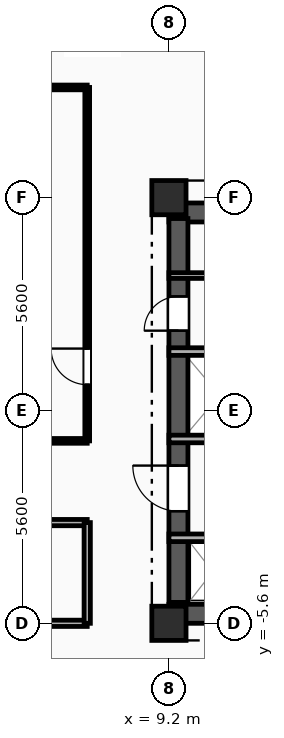
"""IFC4 building model, lengths in metres.
Left out: names, types, materials, properties, quantities, classifications, styles, units other than length and angle.
Written with IfcOpenShell. Run it as: python <this file> out.ifc"""

import sys

from ifc_helpers import new_model, si_unit, direction, frame, frame_2d, origin, origin_2d, place, context, subcontext, project, spatial, rectangle, extrude, element, fill, save


model = new_model("IFC4")
c1 = context("Model", 3, precision=1e-05, world=origin(), true_north=direction((0.0, 1.0)))
c2 = subcontext(c1, "Body", "Model", "MODEL_VIEW")
j1 = project(units=[si_unit("LENGTHUNIT", "METRE"), si_unit("PLANEANGLEUNIT", "RADIAN")], contexts=[c1])
p1 = place(None, origin())
s1 = spatial("IfcSite", under=j1, at=p1, CompositionType="ELEMENT")
p2 = place(p1, origin())
s2 = spatial("IfcBuilding", under=s1, at=p2, CompositionType="ELEMENT")
p3 = place(p2, frame((0.0, 0.0, 134.35)))
s3 = spatial("IfcBuildingStorey", under=s2, at=p3, CompositionType="ELEMENT", Elevation=134.35)
for number, where, z_axis, x_axis in (
    (1, (9.2, -5.6, 0.0), (0.0, 0.0, 1.0), (1.0, 0.0, 0.0)),
    (2, (9.2, 5.6, 0.0), (0.0, 0.0, 1.0), (1.0, 0.0, 0.0)),
):
    element("IfcColumn", number, at=place(p3, frame(where, z_axis=z_axis, x_axis=x_axis)), inside=s3, PredefinedType="COLUMN", context=c2, shape_type="SweptSolid", body=[
        extrude(rectangle(XDim=0.9, YDim=0.9, at=origin_2d()), origin(), (0.0, 0.0, 1.0), 3.35),
    ])
p4 = place(p3, frame((9.2, 5.21, 0.0), z_axis=(0.0, 0.0, 1.0), x_axis=(1.0, 0.0, 0.0)))
e3 = element("IfcWall", 3, at=p4, inside=s3, PredefinedType="SHEAR", context=c2, shape_type="SweptSolid", body=[
    extrude(rectangle(XDim=9.6, YDim=0.5, at=frame_2d((4.8, 0.0))), origin(), (0.0, 0.0, 1.0), 3.04),
])
p5 = place(p4, frame((6.95, 0.0, 0.0)))
e4 = element("IfcOpeningElement", 4, at=p5, cuts=e3, PredefinedType="OPENING", context=c2, shape_type="SweptSolid", body=[
    extrude(rectangle(XDim=1.1, YDim=2.15, at=frame_2d((0.55, 1.075))), frame((0.0, 0.26, 0.0), z_axis=(0.0, -1.0, 0.0), x_axis=(1.0, 0.0, 0.0)), (0.0, 0.0, 1.0), 0.52),
])
p6 = place(p4, frame((3.775, 0.0, 0.0)))
e5 = element("IfcOpeningElement", 5, at=p6, cuts=e3, PredefinedType="OPENING", context=c2, shape_type="SweptSolid", body=[
    extrude(rectangle(XDim=1.05, YDim=2.1, at=frame_2d((0.525, 1.05))), frame((0.0, 0.26, 0.0), z_axis=(0.0, -1.0, 0.0), x_axis=(1.0, 0.0, 0.0)), (0.0, 0.0, 1.0), 0.52),
])
p7 = place(p3, frame((9.2, -5.35, 0.0), z_axis=(0.0, 0.0, 1.0), x_axis=(1.0, 0.0, 0.0)))
e6 = element("IfcWall", 6, at=p7, inside=s3, PredefinedType="SHEAR", context=c2, shape_type="SweptSolid", body=[
    extrude(rectangle(XDim=9.6, YDim=0.5, at=frame_2d((4.8, 0.0))), origin(), (0.0, 0.0, 1.0), 3.04),
])
p8 = place(p7, frame((7.65, 0.0, 0.0)))
e7 = element("IfcOpeningElement", 7, at=p8, cuts=e6, PredefinedType="OPENING", context=c2, shape_type="SweptSolid", body=[
    extrude(rectangle(XDim=0.9, YDim=2.1, at=frame_2d((0.45, 1.05))), frame((0.0, 0.26, 0.0), z_axis=(0.0, -1.0, 0.0), x_axis=(1.0, 0.0, 0.0)), (0.0, 0.0, 1.0), 0.52),
])
p9 = place(p3, frame((9.45, -5.05, 0.0), z_axis=(0.0, 0.0, 1.0), x_axis=(0.0, 1.0, 0.0)))
e8 = element("IfcWall", 8, at=p9, inside=s3, PredefinedType="SHEAR", context=c2, shape_type="SweptSolid", body=[
    extrude(rectangle(XDim=10.1, YDim=0.5, at=frame_2d((5.05, 0.0))), origin(), (0.0, 0.0, 1.0), 3.04),
])
p10 = place(p9, frame((7.15, 0.0, 0.0)))
e9 = element("IfcOpeningElement", 9, at=p10, cuts=e8, PredefinedType="OPENING", context=c2, shape_type="SweptSolid", body=[
    extrude(rectangle(XDim=0.9, YDim=2.1, at=frame_2d((0.45, 1.05))), frame((0.0, 0.26, 0.0), z_axis=(0.0, -1.0, 0.0), x_axis=(1.0, 0.0, 0.0)), (0.0, 0.0, 1.0), 0.52),
])
p11 = place(p9, frame((2.4, 0.0, 0.0)))
e10 = element("IfcOpeningElement", 10, at=p11, cuts=e8, PredefinedType="OPENING", context=c2, shape_type="SweptSolid", body=[
    extrude(rectangle(XDim=1.2, YDim=2.15, at=frame_2d((0.6, 1.075))), frame((0.0, 0.26, 0.0), z_axis=(0.0, -1.0, 0.0), x_axis=(1.0, 0.0, 0.0)), (0.0, 0.0, 1.0), 0.52),
])
p12 = place(p3, frame((12.15, 3.55, 0.0), z_axis=(0.0, 0.0, 1.0), x_axis=(-1.0, 0.0, 0.0)))
e11 = element("IfcWall", 11, at=p12, inside=s3, PredefinedType="PARTITIONING", context=c2, shape_type="SweptSolid", body=[
    extrude(rectangle(XDim=2.95, YDim=0.15, at=frame_2d((1.475, 0.0))), origin(), (0.0, 0.0, 1.0), 3.04),
])
p13 = place(p12, frame((0.325, 0.0, 0.0)))
e12 = element("IfcOpeningElement", 12, at=p13, cuts=e11, PredefinedType="OPENING", context=c2, shape_type="SweptSolid", body=[
    extrude(rectangle(XDim=0.95, YDim=2.1, at=frame_2d((0.475, 1.05))), frame((0.0, 0.085, 0.0), z_axis=(0.0, -1.0, 0.0), x_axis=(1.0, 0.0, 0.0)), (0.0, 0.0, 1.0), 0.17),
])
p14 = place(p3, frame((9.2, -3.35, 0.0), z_axis=(0.0, 0.0, 1.0), x_axis=(1.0, 0.0, 0.0)))
e13 = element("IfcWall", 13, at=p14, inside=s3, PredefinedType="PARTITIONING", context=c2, shape_type="SweptSolid", body=[
    extrude(rectangle(XDim=1.88, YDim=0.2, at=frame_2d((0.94, 0.0))), origin(), (0.0, 0.0, 1.0), 2.755),
])
p15 = place(p3, frame((11.46, -0.75, 0.0), z_axis=(0.0, 0.0, 1.0), x_axis=(-1.0, 0.0, 0.0)))
e14 = element("IfcWall", 14, at=p15, inside=s3, PredefinedType="PARTITIONING", context=c2, shape_type="SweptSolid", body=[
    extrude(rectangle(XDim=2.26, YDim=0.2, at=frame_2d((1.13, 0.0))), origin(), (0.0, 0.0, 1.0), 3.04),
])
p16 = place(p3, frame((7.05, 8.5, 0.0), z_axis=(0.0, 0.0, 1.0), x_axis=(-1.0, 0.0, 0.0)))
e15 = element("IfcWall", 15, at=p16, inside=s3, PredefinedType="PARTITIONING", context=c2, shape_type="SweptSolid", body=[
    extrude(rectangle(XDim=7.05, YDim=0.125, at=frame_2d((3.525, 0.0))), origin(), (0.0, 0.0, 1.0), 3.04),
])
p17 = place(p3, frame((0.0, -5.6, 0.0), z_axis=(0.0, 0.0, 1.0), x_axis=(1.0, 0.0, 0.0)))
e16 = element("IfcWall", 16, at=p17, inside=s3, PredefinedType="PARTITIONING", context=c2, shape_type="SweptSolid", body=[
    extrude(rectangle(XDim=7.05, YDim=0.165, at=frame_2d((3.525, 0.0))), origin(), (0.0, 0.0, 1.0), 2.525),
])
p18 = place(p3, frame((0.0, -0.8, 0.0), z_axis=(0.0, 0.0, 1.0), x_axis=(1.0, 0.0, 0.0)))
e17 = element("IfcWall", 17, at=p18, inside=s3, PredefinedType="PARTITIONING", context=c2, shape_type="SweptSolid", body=[
    extrude(rectangle(XDim=7.05, YDim=0.125, at=frame_2d((3.525, 0.0))), origin(), (0.0, 0.0, 1.0), 3.04),
])
p19 = place(p3, frame((7.05, -2.95, 0.0), z_axis=(0.0, 0.0, 1.0), x_axis=(-1.0, 0.0, 0.0)))
e18 = element("IfcWall", 18, at=p19, inside=s3, PredefinedType="PARTITIONING", context=c2, shape_type="SweptSolid", body=[
    extrude(rectangle(XDim=14.1, YDim=0.165, at=frame_2d((7.05, 0.0))), origin(), (0.0, 0.0, 1.0), 3.04),
])
p20 = place(p19, frame((6.475, 0.0, 0.0)))
e19 = element("IfcOpeningElement", 19, at=p20, cuts=e18, PredefinedType="OPENING", context=c2, shape_type="SweptSolid", body=[
    extrude(rectangle(XDim=1.15, YDim=2.15, at=frame_2d((0.575, 1.075))), frame((0.0, 0.093, 0.0), z_axis=(0.0, -1.0, 0.0), x_axis=(1.0, 0.0, 0.0)), (0.0, 0.0, 1.0), 0.185),
])
p21 = place(p3, frame((7.05, -0.8, 0.0), z_axis=(0.0, 0.0, 1.0), x_axis=(0.0, 1.0, 0.0)))
e20 = element("IfcWall", 20, at=p21, inside=s3, PredefinedType="PARTITIONING", context=c2, shape_type="SweptSolid", body=[
    extrude(rectangle(XDim=9.3, YDim=0.125, at=frame_2d((4.65, 0.0))), origin(), (0.0, 0.0, 1.0), 3.04),
])
p22 = place(p21, frame((1.479, 0.0, 0.0)))
e21 = element("IfcOpeningElement", 21, at=p22, cuts=e20, PredefinedType="OPENING", context=c2, shape_type="SweptSolid", body=[
    extrude(rectangle(XDim=0.95, YDim=2.1, at=frame_2d((0.475, 1.05))), frame((0.0, 0.073, 0.0), z_axis=(0.0, -1.0, 0.0), x_axis=(1.0, 0.0, 0.0)), (0.0, 0.0, 1.0), 0.145),
])
p23 = place(p3, frame((7.05, -5.6, 0.0), z_axis=(0.0, 0.0, 1.0), x_axis=(0.0, 1.0, 0.0)))
e22 = element("IfcWall", 22, at=p23, inside=s3, PredefinedType="PARTITIONING", context=c2, shape_type="SweptSolid", body=[
    extrude(rectangle(XDim=2.65, YDim=0.165, at=frame_2d((1.325, 0.0))), origin(), (0.0, 0.0, 1.0), 3.04),
])
p24 = place(p3, frame((9.2, 1.55, 0.0), z_axis=(0.0, 0.0, 1.0), x_axis=(1.0, 0.0, 0.0)))
e23 = element("IfcWall", 23, at=p24, inside=s3, PredefinedType="PARTITIONING", context=c2, shape_type="SweptSolid", body=[
    extrude(rectangle(XDim=5.82, YDim=0.2, at=frame_2d((2.91, 0.0))), origin(), (0.0, 0.0, 1.0), 3.04),
])
p25 = place(p10, origin())
e24 = element("IfcDoor", 24, at=p25, inside=s3, OperationType="SINGLE_SWING_LEFT", PredefinedType="DOOR", context=c2, shape_type="SweptSolid", body=[
    extrude(rectangle(XDim=0.9, YDim=2.1, at=frame_2d((0.45, 1.05))), frame((0.0, 0.025, 0.0), z_axis=(0.0, -1.0, 0.0), x_axis=(1.0, 0.0, 0.0)), (0.0, 0.0, 1.0), 0.05),
])
fill(e9, e24)
p26 = place(p11, origin())
e25 = element("IfcDoor", 25, at=p26, inside=s3, OperationType="SINGLE_SWING_RIGHT", PredefinedType="DOOR", context=c2, shape_type="SweptSolid", body=[
    extrude(rectangle(XDim=1.2, YDim=2.15, at=frame_2d((0.6, 1.075))), frame((0.0, 0.025, 0.0), z_axis=(0.0, -1.0, 0.0), x_axis=(1.0, 0.0, 0.0)), (0.0, 0.0, 1.0), 0.05),
])
fill(e10, e25)
p27 = place(p22, origin())
e26 = element("IfcDoor", 26, at=p27, inside=s3, OperationType="SINGLE_SWING_RIGHT", PredefinedType="DOOR", context=c2, shape_type="SweptSolid", body=[
    extrude(rectangle(XDim=0.95, YDim=2.1, at=frame_2d((0.475, 1.05))), frame((0.0, 0.025, 0.0), z_axis=(0.0, -1.0, 0.0), x_axis=(1.0, 0.0, 0.0)), (0.0, 0.0, 1.0), 0.05),
])
fill(e21, e26)
save(model, sys.argv[1])
